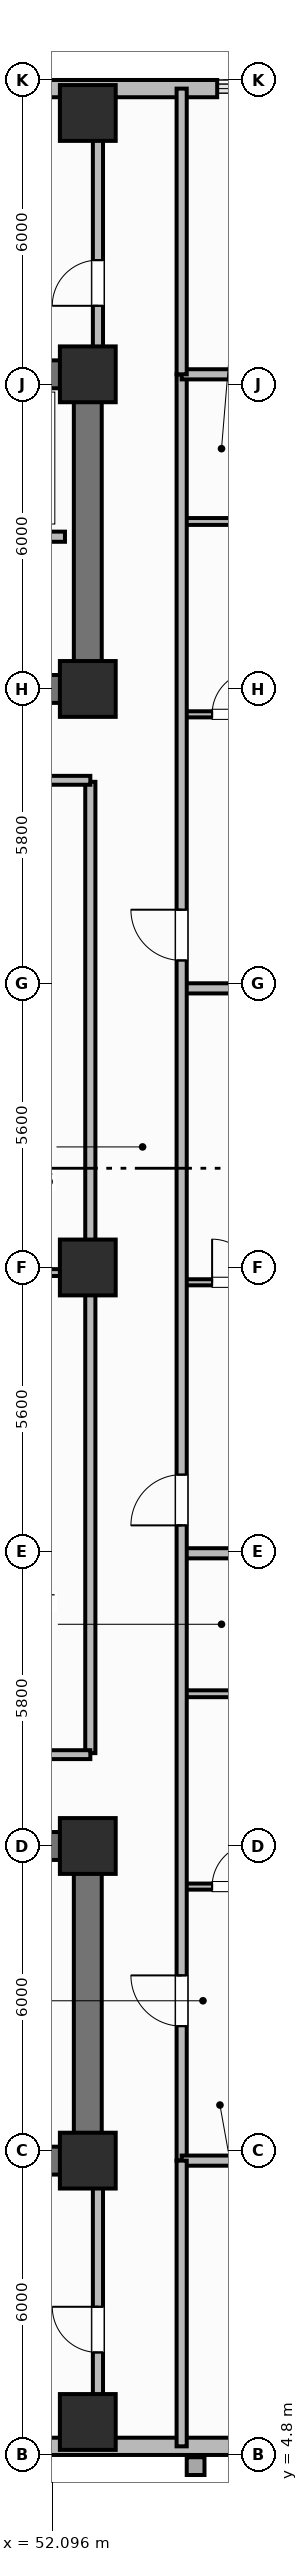
"""IFC4 building model, lengths in metres.
Left out: names, types, materials, properties, quantities, classifications, styles, units other than length and angle.
Written with IfcOpenShell. Run it as: python <this file> out.ifc"""

import sys

from ifc_helpers import new_model, si_unit, direction, frame, frame_2d, origin, origin_2d, place, context, subcontext, project, spatial, rectangle, extrude, element, fill, save


model = new_model("IFC4")
c1 = context("Model", 3, precision=1e-05, world=origin(), true_north=direction((0.0, 1.0)))
c2 = subcontext(c1, "Body", "Model", "MODEL_VIEW")
j1 = project(units=[si_unit("LENGTHUNIT", "METRE"), si_unit("PLANEANGLEUNIT", "RADIAN")], contexts=[c1])
p1 = place(None, origin())
s1 = spatial("IfcSite", under=j1, at=p1, CompositionType="ELEMENT")
p2 = place(p1, origin())
s2 = spatial("IfcBuilding", under=s1, at=p2, CompositionType="ELEMENT")
p3 = place(p2, frame((0.0, 0.0, 117.9)))
s3 = spatial("IfcBuildingStorey", under=s2, at=p3, CompositionType="ELEMENT", Elevation=117.9)
p4 = place(p3, frame((52.8, 10.6, 0.0), z_axis=(0.0, 0.0, 1.0), x_axis=(-1.0, 0.0, 0.0)))
e1 = element("IfcWall", 1, at=p4, inside=s3, PredefinedType="SHEAR", context=c2, shape_type="SweptSolid", body=[
    extrude(rectangle(XDim=27.2, YDim=0.55, at=frame_2d((13.6, 0.0))), origin(), (0.0, 0.0, 1.0), 3.7),
])
p5 = place(p3, frame((52.8, 10.875, 0.0), z_axis=(0.0, 0.0, 1.0), x_axis=(0.0, 1.0, 0.0)))
e2 = element("IfcWall", 2, at=p5, inside=s3, PredefinedType="SHEAR", context=c2, shape_type="SweptSolid", body=[
    extrude(rectangle(XDim=5.65, YDim=0.55, at=frame_2d((2.825, 0.0))), origin(), (0.0, 0.0, 1.0), 3.7),
])
p6 = place(p3, frame((25.6, 16.8, 0.0), z_axis=(0.0, 0.0, 1.0), x_axis=(1.0, 0.0, 0.0)))
e3 = element("IfcWall", 3, at=p6, inside=s3, PredefinedType="SHEAR", context=c2, shape_type="SweptSolid", body=[
    extrude(rectangle(XDim=27.2, YDim=0.55, at=frame_2d((13.6, 0.0))), origin(), (0.0, 0.0, 1.0), 3.7),
])
p7 = place(p6, frame((1.9, 0.0, 0.0)))
e4 = element("IfcOpeningElement", 4, at=p7, cuts=e3, PredefinedType="OPENING", context=c2, shape_type="SweptSolid", body=[
    extrude(rectangle(XDim=1.1, YDim=2.15, at=frame_2d((0.55, 1.075))), frame((0.0, 0.285, 0.0), z_axis=(0.0, -1.0, 0.0), x_axis=(1.0, 0.0, 0.0)), (0.0, 0.0, 1.0), 0.57),
])
p8 = place(p6, frame((13.0, 0.0, 0.0)))
e5 = element("IfcOpeningElement", 5, at=p8, cuts=e3, PredefinedType="OPENING", context=c2, shape_type="SweptSolid", body=[
    extrude(rectangle(XDim=1.2, YDim=2.15, at=frame_2d((0.6, 1.075))), frame((0.0, 0.285, 0.0), z_axis=(0.0, -1.0, 0.0), x_axis=(1.0, 0.0, 0.0)), (0.0, 0.0, 1.0), 0.57),
])
p9 = place(p6, frame((21.6, 0.0, 0.0)))
e6 = element("IfcOpeningElement", 6, at=p9, cuts=e3, PredefinedType="OPENING", context=c2, shape_type="SweptSolid", body=[
    extrude(rectangle(XDim=1.0, YDim=2.15, at=frame_2d((0.5, 1.075))), frame((0.0, 0.285, 0.0), z_axis=(0.0, -1.0, 0.0), x_axis=(1.0, 0.0, 0.0)), (0.0, 0.0, 1.0), 0.57),
])
p10 = place(p3, frame((25.6, 45.8, 0.0), z_axis=(0.0, 0.0, 1.0), x_axis=(1.0, 0.0, 0.0)))
e7 = element("IfcWall", 7, at=p10, inside=s3, PredefinedType="SHEAR", context=c2, shape_type="SweptSolid", body=[
    extrude(rectangle(XDim=27.2, YDim=0.55, at=frame_2d((13.6, 0.0))), origin(), (0.0, 0.0, 1.0), 3.7),
])
p11 = place(p3, frame((52.8, 39.875, 0.0), z_axis=(0.0, 0.0, 1.0), x_axis=(0.0, 1.0, 0.0)))
e8 = element("IfcWall", 8, at=p11, inside=s3, PredefinedType="SHEAR", context=c2, shape_type="SweptSolid", body=[
    extrude(rectangle(XDim=5.65, YDim=0.55, at=frame_2d((2.825, 0.0))), origin(), (0.0, 0.0, 1.0), 3.7),
])
p12 = place(p3, frame((52.8, 39.6, 0.0), z_axis=(0.0, 0.0, 1.0), x_axis=(-1.0, 0.0, 0.0)))
e9 = element("IfcWall", 9, at=p12, inside=s3, PredefinedType="SHEAR", context=c2, shape_type="SweptSolid", body=[
    extrude(rectangle(XDim=27.2, YDim=0.55, at=frame_2d((13.6, 0.0))), origin(), (0.0, 0.0, 1.0), 3.7),
])
p13 = place(p12, frame((24.2, 0.0, 0.0)))
e10 = element("IfcOpeningElement", 10, at=p13, cuts=e9, PredefinedType="OPENING", context=c2, shape_type="SweptSolid", body=[
    extrude(rectangle(XDim=1.1, YDim=2.15, at=frame_2d((0.55, 1.075))), frame((0.0, 0.285, 0.0), z_axis=(0.0, -1.0, 0.0), x_axis=(1.0, 0.0, 0.0)), (0.0, 0.0, 1.0), 0.57),
])
p14 = place(p12, frame((15.1, 0.0, 0.0)))
e11 = element("IfcOpeningElement", 11, at=p14, cuts=e9, PredefinedType="OPENING", context=c2, shape_type="SweptSolid", body=[
    extrude(rectangle(XDim=1.2, YDim=2.15, at=frame_2d((0.6, 1.075))), frame((0.0, 0.285, 0.0), z_axis=(0.0, -1.0, 0.0), x_axis=(1.0, 0.0, 0.0)), (0.0, 0.0, 1.0), 0.57),
])
p15 = place(p12, frame((11.3, 0.0, 0.0)))
e12 = element("IfcOpeningElement", 12, at=p15, cuts=e9, PredefinedType="OPENING", context=c2, shape_type="SweptSolid", body=[
    extrude(rectangle(XDim=1.3, YDim=2.2, at=frame_2d((0.65, 1.1))), frame((0.0, 0.285, 0.0), z_axis=(0.0, -1.0, 0.0), x_axis=(1.0, 0.0, 0.0)), (0.0, 0.0, 1.0), 0.57),
])
p16 = place(p12, frame((7.25, 0.0, 0.0)))
e13 = element("IfcOpeningElement", 13, at=p16, cuts=e9, PredefinedType="OPENING", context=c2, shape_type="SweptSolid", body=[
    extrude(rectangle(XDim=0.85, YDim=2.1, at=frame_2d((0.425, 1.05))), frame((0.0, 0.285, 0.0), z_axis=(0.0, -1.0, 0.0), x_axis=(1.0, 0.0, 0.0)), (0.0, 0.0, 1.0), 0.57),
])
p17 = place(p12, frame((3.0, 0.0, 0.0)))
e14 = element("IfcOpeningElement", 14, at=p17, cuts=e9, PredefinedType="OPENING", context=c2, shape_type="SweptSolid", body=[
    extrude(rectangle(XDim=0.9, YDim=2.1, at=frame_2d((0.45, 1.05))), frame((0.0, 0.285, 0.0), z_axis=(0.0, -1.0, 0.0), x_axis=(1.0, 0.0, 0.0)), (0.0, 0.0, 1.0), 0.57),
])
for number, where, z_axis, x_axis in (
    (15, (52.8, 10.6, 0.0), (0.0, 0.0, 1.0), (1.0, 0.0, 0.0)),
    (16, (52.8, 16.8, 0.0), (0.0, 0.0, 1.0), (1.0, 0.0, 0.0)),
    (17, (52.8, 39.6, 0.0), (0.0, 0.0, 1.0), (1.0, 0.0, 0.0)),
    (18, (52.8, 45.8, 0.0), (0.0, 0.0, 1.0), (1.0, 0.0, 0.0)),
    (19, (52.8, 28.2, 0.0), (0.0, 0.0, 1.0), (1.0, 0.0, 0.0)),
    (20, (52.8, 5.45, 0.0), (0.0, 0.0, 1.0), (1.0, 0.0, 0.0)),
    (21, (52.8, 50.95, 0.0), (0.0, 0.0, 1.0), (1.0, 0.0, 0.0)),
):
    element("IfcColumn", number, at=place(p3, frame(where, z_axis=z_axis, x_axis=x_axis)), inside=s3, PredefinedType="COLUMN", context=c2, shape_type="SweptSolid", body=[
        extrude(rectangle(XDim=1.1, YDim=1.1, at=origin_2d()), origin(), (0.0, 0.0, 1.0), 3.7),
    ])
p18 = place(p3, frame((50.05, 4.97, 0.0), z_axis=(0.0, 0.0, 1.0), x_axis=(1.0, 0.0, 0.0)))
e22 = element("IfcWall", 22, at=p18, inside=s3, PredefinedType="SOLIDWALL", context=c2, shape_type="SweptSolid", body=[
    extrude(rectangle(XDim=9.75, YDim=0.34, at=frame_2d((4.875, 0.0))), origin(), (0.0, 0.0, 1.0), 2.7),
])
p19 = place(p18, frame((5.938, 0.0, 0.68)))
e23 = element("IfcOpeningElement", 23, at=p19, cuts=e22, PredefinedType="OPENING", context=c2, shape_type="SweptSolid", body=[
    extrude(rectangle(XDim=2.1, YDim=1.9, at=frame_2d((1.05, 0.95))), frame((0.0, 0.18, 0.0), z_axis=(0.0, -1.0, 0.0), x_axis=(1.0, 0.0, 0.0)), (0.0, 0.0, 1.0), 0.36),
])
p20 = place(p3, frame((55.35, 51.43, 0.0), z_axis=(0.0, 0.0, 1.0), x_axis=(-1.0, 0.0, 0.0)))
e24 = element("IfcWall", 24, at=p20, inside=s3, PredefinedType="SOLIDWALL", context=c2, shape_type="SweptSolid", body=[
    extrude(rectangle(XDim=12.95, YDim=0.34, at=frame_2d((6.475, 0.0))), origin(), (0.0, 0.0, 1.0), 2.7),
])
p21 = place(p20, frame((5.775, 0.0, 0.73)))
e25 = element("IfcOpeningElement", 25, at=p21, cuts=e24, PredefinedType="OPENING", context=c2, shape_type="SweptSolid", body=[
    extrude(rectangle(XDim=1.4, YDim=1.85, at=frame_2d((0.7, 0.925))), frame((0.0, 0.18, 0.0), z_axis=(0.0, -1.0, 0.0), x_axis=(1.0, 0.0, 0.0)), (0.0, 0.0, 1.0), 0.36),
])
p22 = place(p3, frame((52.35, 42.6, 0.0), z_axis=(0.0, 0.0, 1.0), x_axis=(-1.0, 0.0, 0.0)))
e26 = element("IfcWall", 26, at=p22, inside=s3, PredefinedType="PARTITIONING", context=c2, shape_type="SweptSolid", body=[
    extrude(rectangle(XDim=8.8, YDim=0.2, at=frame_2d((4.4, 0.0))), origin(), (0.0, 0.0, 1.0), 2.53),
])
p23 = place(p22, frame((7.1, 0.0, 0.0)))
e27 = element("IfcOpeningElement", 27, at=p23, cuts=e26, PredefinedType="OPENING", context=c2, shape_type="SweptSolid", body=[
    extrude(rectangle(XDim=1.0, YDim=2.15, at=frame_2d((0.5, 1.075))), frame((0.0, 0.11, 0.0), z_axis=(0.0, -1.0, 0.0), x_axis=(1.0, 0.0, 0.0)), (0.0, 0.0, 1.0), 0.22),
])
p24 = place(p3, frame((52.85, 18.63, 0.0), z_axis=(0.0, 0.0, 1.0), x_axis=(0.0, 1.0, 0.0)))
e28 = element("IfcWall", 28, at=p24, inside=s3, PredefinedType="PARTITIONING", context=c2, shape_type="SweptSolid", body=[
    extrude(rectangle(XDim=19.14, YDim=0.2, at=frame_2d((9.57, 0.0))), origin(), (0.0, 0.0, 1.0), 2.53),
])
for number, where, z_axis, x_axis in (
    (29, (46.35, 18.6, 0.0), (0.0, 0.0, 1.0), (1.0, 0.0, 0.0)),
    (30, (46.35, 37.8, 0.0), (0.0, 0.0, 1.0), (1.0, 0.0, 0.0)),
):
    element("IfcWall", number, at=place(p3, frame(where, z_axis=z_axis, x_axis=x_axis)), inside=s3, PredefinedType="PARTITIONING", context=c2, shape_type="SweptSolid", body=[
        extrude(rectangle(XDim=6.5, YDim=0.175, at=frame_2d((3.25, 0.0))), origin(), (0.0, 0.0, 1.0), 2.53),
    ])
p25 = place(p3, frame((46.38, 28.1, 0.0), z_axis=(0.0, 0.0, 1.0), x_axis=(1.0, 0.0, 0.0)))
e31 = element("IfcWall", 31, at=p25, inside=s3, PredefinedType="PARTITIONING", context=c2, shape_type="SweptSolid", body=[
    extrude(rectangle(XDim=6.42, YDim=0.135, at=frame_2d((3.21, 0.0))), origin(), (0.0, 0.0, 1.0), 2.53),
])
p26 = place(p3, frame((54.65, 16.0, 0.0), z_axis=(0.0, 0.0, 1.0), x_axis=(1.0, 0.0, 0.0)))
e32 = element("IfcWall", 32, at=p26, inside=s3, PredefinedType="PARTITIONING", context=c2, shape_type="SweptSolid", body=[
    extrude(rectangle(XDim=2.25, YDim=0.12, at=frame_2d((1.125, 0.0))), origin(), (0.0, 0.0, 1.0), 2.53),
])
p27 = place(p26, frame((0.6, 0.0, 0.0)))
e33 = element("IfcOpeningElement", 33, at=p27, cuts=e32, PredefinedType="OPENING", context=c2, shape_type="SweptSolid", body=[
    extrude(rectangle(XDim=0.85, YDim=2.1, at=frame_2d((0.425, 1.05))), frame((0.0, 0.07, 0.0), z_axis=(0.0, -1.0, 0.0), x_axis=(1.0, 0.0, 0.0)), (0.0, 0.0, 1.0), 0.14),
])
p28 = place(p3, frame((54.65, 19.8, 0.0), z_axis=(0.0, 0.0, 1.0), x_axis=(1.0, 0.0, 0.0)))
e34 = element("IfcWall", 34, at=p28, inside=s3, PredefinedType="PARTITIONING", context=c2, shape_type="SweptSolid", body=[
    extrude(rectangle(XDim=2.25, YDim=0.135, at=frame_2d((1.125, 0.0))), origin(), (0.0, 0.0, 1.0), 2.53),
])
p29 = place(p3, frame((54.65, 22.568, 0.0), z_axis=(0.0, 0.0, 1.0), x_axis=(1.0, 0.0, 0.0)))
e35 = element("IfcWall", 35, at=p29, inside=s3, PredefinedType="PARTITIONING", context=c2, shape_type="SweptSolid", body=[
    extrude(rectangle(XDim=9.18, YDim=0.2, at=frame_2d((4.59, 0.0))), origin(), (0.0, 0.0, 1.0), 2.53),
])
p30 = place(p3, frame((54.65, 27.908, 0.0), z_axis=(0.0, 0.0, 1.0), x_axis=(1.0, 0.0, 0.0)))
e36 = element("IfcWall", 36, at=p30, inside=s3, PredefinedType="PARTITIONING", context=c2, shape_type="SweptSolid", body=[
    extrude(rectangle(XDim=2.25, YDim=0.12, at=frame_2d((1.125, 0.0))), origin(), (0.0, 0.0, 1.0), 2.53),
])
p31 = place(p30, frame((0.6, 0.0, 0.0)))
e37 = element("IfcOpeningElement", 37, at=p31, cuts=e36, PredefinedType="OPENING", context=c2, shape_type="SweptSolid", body=[
    extrude(rectangle(XDim=0.85, YDim=2.1, at=frame_2d((0.425, 1.05))), frame((0.0, 0.07, 0.0), z_axis=(0.0, -1.0, 0.0), x_axis=(1.0, 0.0, 0.0)), (0.0, 0.0, 1.0), 0.14),
])
p32 = place(p3, frame((54.65, 33.7, 0.0), z_axis=(0.0, 0.0, 1.0), x_axis=(1.0, 0.0, 0.0)))
e38 = element("IfcWall", 38, at=p32, inside=s3, PredefinedType="PARTITIONING", context=c2, shape_type="SweptSolid", body=[
    extrude(rectangle(XDim=9.18, YDim=0.2, at=frame_2d((4.59, 0.0))), origin(), (0.0, 0.0, 1.0), 2.53),
])
p33 = place(p3, frame((54.65, 39.1, 0.0), z_axis=(0.0, 0.0, 1.0), x_axis=(1.0, 0.0, 0.0)))
e39 = element("IfcWall", 39, at=p33, inside=s3, PredefinedType="PARTITIONING", context=c2, shape_type="SweptSolid", body=[
    extrude(rectangle(XDim=2.25, YDim=0.12, at=frame_2d((1.125, 0.0))), origin(), (0.0, 0.0, 1.0), 2.53),
])
p34 = place(p33, frame((0.6, 0.0, 0.0)))
e40 = element("IfcOpeningElement", 40, at=p34, cuts=e39, PredefinedType="OPENING", context=c2, shape_type="SweptSolid", body=[
    extrude(rectangle(XDim=0.85, YDim=2.1, at=frame_2d((0.425, 1.05))), frame((0.0, 0.07, 0.0), z_axis=(0.0, -1.0, 0.0), x_axis=(1.0, 0.0, 0.0)), (0.0, 0.0, 1.0), 0.14),
])
p35 = place(p3, frame((54.65, 42.9, 0.0), z_axis=(0.0, 0.0, 1.0), x_axis=(1.0, 0.0, 0.0)))
e41 = element("IfcWall", 41, at=p35, inside=s3, PredefinedType="PARTITIONING", context=c2, shape_type="SweptSolid", body=[
    extrude(rectangle(XDim=2.25, YDim=0.135, at=frame_2d((1.125, 0.0))), origin(), (0.0, 0.0, 1.0), 2.53),
])
p36 = place(p3, frame((54.65, 10.6, 0.0), z_axis=(0.0, 0.0, 1.0), x_axis=(0.0, 1.0, 0.0)))
e42 = element("IfcWall", 42, at=p36, inside=s3, PredefinedType="PARTITIONING", context=c2, shape_type="SweptSolid", body=[
    extrude(rectangle(XDim=35.2, YDim=0.2, at=frame_2d((17.6, 0.0))), origin(), (0.0, 0.0, 1.0), 2.53),
])
p37 = place(p36, frame((2.65, 0.0, 0.0)))
e43 = element("IfcOpeningElement", 43, at=p37, cuts=e42, PredefinedType="OPENING", context=c2, shape_type="SweptSolid", body=[
    extrude(rectangle(XDim=1.0, YDim=2.15, at=frame_2d((0.5, 1.075))), frame((0.0, 0.11, 0.0), z_axis=(0.0, -1.0, 0.0), x_axis=(1.0, 0.0, 0.0)), (0.0, 0.0, 1.0), 0.22),
])
p38 = place(p36, frame((12.518, 0.0, 0.0)))
e44 = element("IfcOpeningElement", 44, at=p38, cuts=e42, PredefinedType="OPENING", context=c2, shape_type="SweptSolid", body=[
    extrude(rectangle(XDim=1.0, YDim=2.15, at=frame_2d((0.5, 1.075))), frame((0.0, 0.11, 0.0), z_axis=(0.0, -1.0, 0.0), x_axis=(1.0, 0.0, 0.0)), (0.0, 0.0, 1.0), 0.22),
])
p39 = place(p36, frame((23.65, 0.0, 0.0)))
e45 = element("IfcOpeningElement", 45, at=p39, cuts=e42, PredefinedType="OPENING", context=c2, shape_type="SweptSolid", body=[
    extrude(rectangle(XDim=1.0, YDim=2.15, at=frame_2d((0.5, 1.075))), frame((0.0, 0.11, 0.0), z_axis=(0.0, -1.0, 0.0), x_axis=(1.0, 0.0, 0.0)), (0.0, 0.0, 1.0), 0.22),
])
for number, where, z_axis, x_axis in (
    (46, (54.65, 10.6, 0.0), (0.0, 0.0, 1.0), (1.0, 0.0, 0.0)),
    (47, (54.65, 45.8, 0.0), (0.0, 0.0, 1.0), (1.0, 0.0, 0.0)),
):
    element("IfcWall", number, at=place(p3, frame(where, z_axis=z_axis, x_axis=x_axis)), inside=s3, PredefinedType="PARTITIONING", context=c2, shape_type="SweptSolid", body=[
        extrude(rectangle(XDim=8.76, YDim=0.2, at=frame_2d((4.38, 0.0))), origin(), (0.0, 0.0, 1.0), 2.53),
    ])
p40 = place(p3, frame((54.65, 4.97, 0.0), z_axis=(0.0, 0.0, 1.0), x_axis=(0.0, 1.0, 0.0)))
e48 = element("IfcWall", 48, at=p40, inside=s3, PredefinedType="PARTITIONING", context=c2, shape_type="SweptSolid", body=[
    extrude(rectangle(XDim=5.63, YDim=0.2, at=frame_2d((2.815, 0.0))), origin(), (0.0, 0.0, 1.0), 2.53),
])
p41 = place(p3, frame((54.65, 45.8, 0.0), z_axis=(0.0, 0.0, 1.0), x_axis=(0.0, 1.0, 0.0)))
e49 = element("IfcWall", 49, at=p41, inside=s3, PredefinedType="PARTITIONING", context=c2, shape_type="SweptSolid", body=[
    extrude(rectangle(XDim=5.63, YDim=0.2, at=frame_2d((2.815, 0.0))), origin(), (0.0, 0.0, 1.0), 2.53),
])
p42 = place(p3, frame((53.0, 5.77, 0.0), z_axis=(0.0, 0.0, 1.0), x_axis=(0.0, 1.0, 0.0)))
e50 = element("IfcWall", 50, at=p42, inside=s3, PredefinedType="PARTITIONING", context=c2, shape_type="SweptSolid", body=[
    extrude(rectangle(XDim=4.53, YDim=0.2, at=frame_2d((2.265, 0.0))), origin(), (0.0, 0.0, 1.0), 2.53),
])
p43 = place(p42, frame((1.05, 0.0, 0.0)))
e51 = element("IfcOpeningElement", 51, at=p43, cuts=e50, PredefinedType="OPENING", context=c2, shape_type="SweptSolid", body=[
    extrude(rectangle(XDim=0.9, YDim=2.1, at=frame_2d((0.45, 1.05))), frame((0.0, 0.11, 0.0), z_axis=(0.0, -1.0, 0.0), x_axis=(1.0, 0.0, 0.0)), (0.0, 0.0, 1.0), 0.22),
])
p44 = place(p3, frame((53.0, 46.1, 0.0), z_axis=(0.0, 0.0, 1.0), x_axis=(0.0, 1.0, 0.0)))
e52 = element("IfcWall", 52, at=p44, inside=s3, PredefinedType="PARTITIONING", context=c2, shape_type="SweptSolid", body=[
    extrude(rectangle(XDim=4.53, YDim=0.2, at=frame_2d((2.265, 0.0))), origin(), (0.0, 0.0, 1.0), 2.53),
])
p45 = place(p44, frame((1.05, 0.0, 0.0)))
e53 = element("IfcOpeningElement", 53, at=p45, cuts=e52, PredefinedType="OPENING", context=c2, shape_type="SweptSolid", body=[
    extrude(rectangle(XDim=0.9, YDim=2.1, at=frame_2d((0.45, 1.05))), frame((0.0, 0.11, 0.0), z_axis=(0.0, -1.0, 0.0), x_axis=(1.0, 0.0, 0.0)), (0.0, 0.0, 1.0), 0.22),
])
p46 = place(p27, origin())
e54 = element("IfcDoor", 54, at=p46, inside=s3, OperationType="SINGLE_SWING_RIGHT", PredefinedType="DOOR", context=c2, shape_type="SweptSolid", body=[
    extrude(rectangle(XDim=0.85, YDim=2.1, at=frame_2d((0.425, 1.05))), frame((0.0, 0.025, 0.0), z_axis=(0.0, -1.0, 0.0), x_axis=(1.0, 0.0, 0.0)), (0.0, 0.0, 1.0), 0.05),
])
fill(e33, e54)
p47 = place(p31, origin())
e55 = element("IfcDoor", 55, at=p47, inside=s3, OperationType="SINGLE_SWING_LEFT", PredefinedType="DOOR", context=c2, shape_type="SweptSolid", body=[
    extrude(rectangle(XDim=0.85, YDim=2.1, at=frame_2d((0.425, 1.05))), frame((0.0, 0.025, 0.0), z_axis=(0.0, -1.0, 0.0), x_axis=(1.0, 0.0, 0.0)), (0.0, 0.0, 1.0), 0.05),
])
fill(e37, e55)
p48 = place(p34, origin())
e56 = element("IfcDoor", 56, at=p48, inside=s3, OperationType="SINGLE_SWING_RIGHT", PredefinedType="DOOR", context=c2, shape_type="SweptSolid", body=[
    extrude(rectangle(XDim=0.85, YDim=2.1, at=frame_2d((0.425, 1.05))), frame((0.0, 0.025, 0.0), z_axis=(0.0, -1.0, 0.0), x_axis=(1.0, 0.0, 0.0)), (0.0, 0.0, 1.0), 0.05),
])
fill(e40, e56)
p49 = place(p37, origin())
e57 = element("IfcDoor", 57, at=p49, inside=s3, OperationType="SINGLE_SWING_RIGHT", PredefinedType="DOOR", context=c2, shape_type="SweptSolid", body=[
    extrude(rectangle(XDim=1.0, YDim=2.15, at=frame_2d((0.5, 1.075))), frame((0.0, 0.025, 0.0), z_axis=(0.0, -1.0, 0.0), x_axis=(1.0, 0.0, 0.0)), (0.0, 0.0, 1.0), 0.05),
])
fill(e43, e57)
p50 = place(p38, origin())
e58 = element("IfcDoor", 58, at=p50, inside=s3, OperationType="SINGLE_SWING_LEFT", PredefinedType="DOOR", context=c2, shape_type="SweptSolid", body=[
    extrude(rectangle(XDim=1.0, YDim=2.15, at=frame_2d((0.5, 1.075))), frame((0.0, 0.025, 0.0), z_axis=(0.0, -1.0, 0.0), x_axis=(1.0, 0.0, 0.0)), (0.0, 0.0, 1.0), 0.05),
])
fill(e44, e58)
p51 = place(p39, origin())
e59 = element("IfcDoor", 59, at=p51, inside=s3, OperationType="SINGLE_SWING_RIGHT", PredefinedType="DOOR", context=c2, shape_type="SweptSolid", body=[
    extrude(rectangle(XDim=1.0, YDim=2.15, at=frame_2d((0.5, 1.075))), frame((0.0, 0.025, 0.0), z_axis=(0.0, -1.0, 0.0), x_axis=(1.0, 0.0, 0.0)), (0.0, 0.0, 1.0), 0.05),
])
fill(e45, e59)
p52 = place(p43, origin())
e60 = element("IfcDoor", 60, at=p52, inside=s3, OperationType="SINGLE_SWING_RIGHT", PredefinedType="DOOR", context=c2, shape_type="SweptSolid", body=[
    extrude(rectangle(XDim=0.9, YDim=2.1, at=frame_2d((0.45, 1.05))), frame((0.0, 0.025, 0.0), z_axis=(0.0, -1.0, 0.0), x_axis=(1.0, 0.0, 0.0)), (0.0, 0.0, 1.0), 0.05),
])
fill(e51, e60)
p53 = place(p45, origin())
e61 = element("IfcDoor", 61, at=p53, inside=s3, OperationType="SINGLE_SWING_LEFT", PredefinedType="DOOR", context=c2, shape_type="SweptSolid", body=[
    extrude(rectangle(XDim=0.9, YDim=2.1, at=frame_2d((0.45, 1.05))), frame((0.0, 0.025, 0.0), z_axis=(0.0, -1.0, 0.0), x_axis=(1.0, 0.0, 0.0)), (0.0, 0.0, 1.0), 0.05),
])
fill(e53, e61)
save(model, sys.argv[1])
